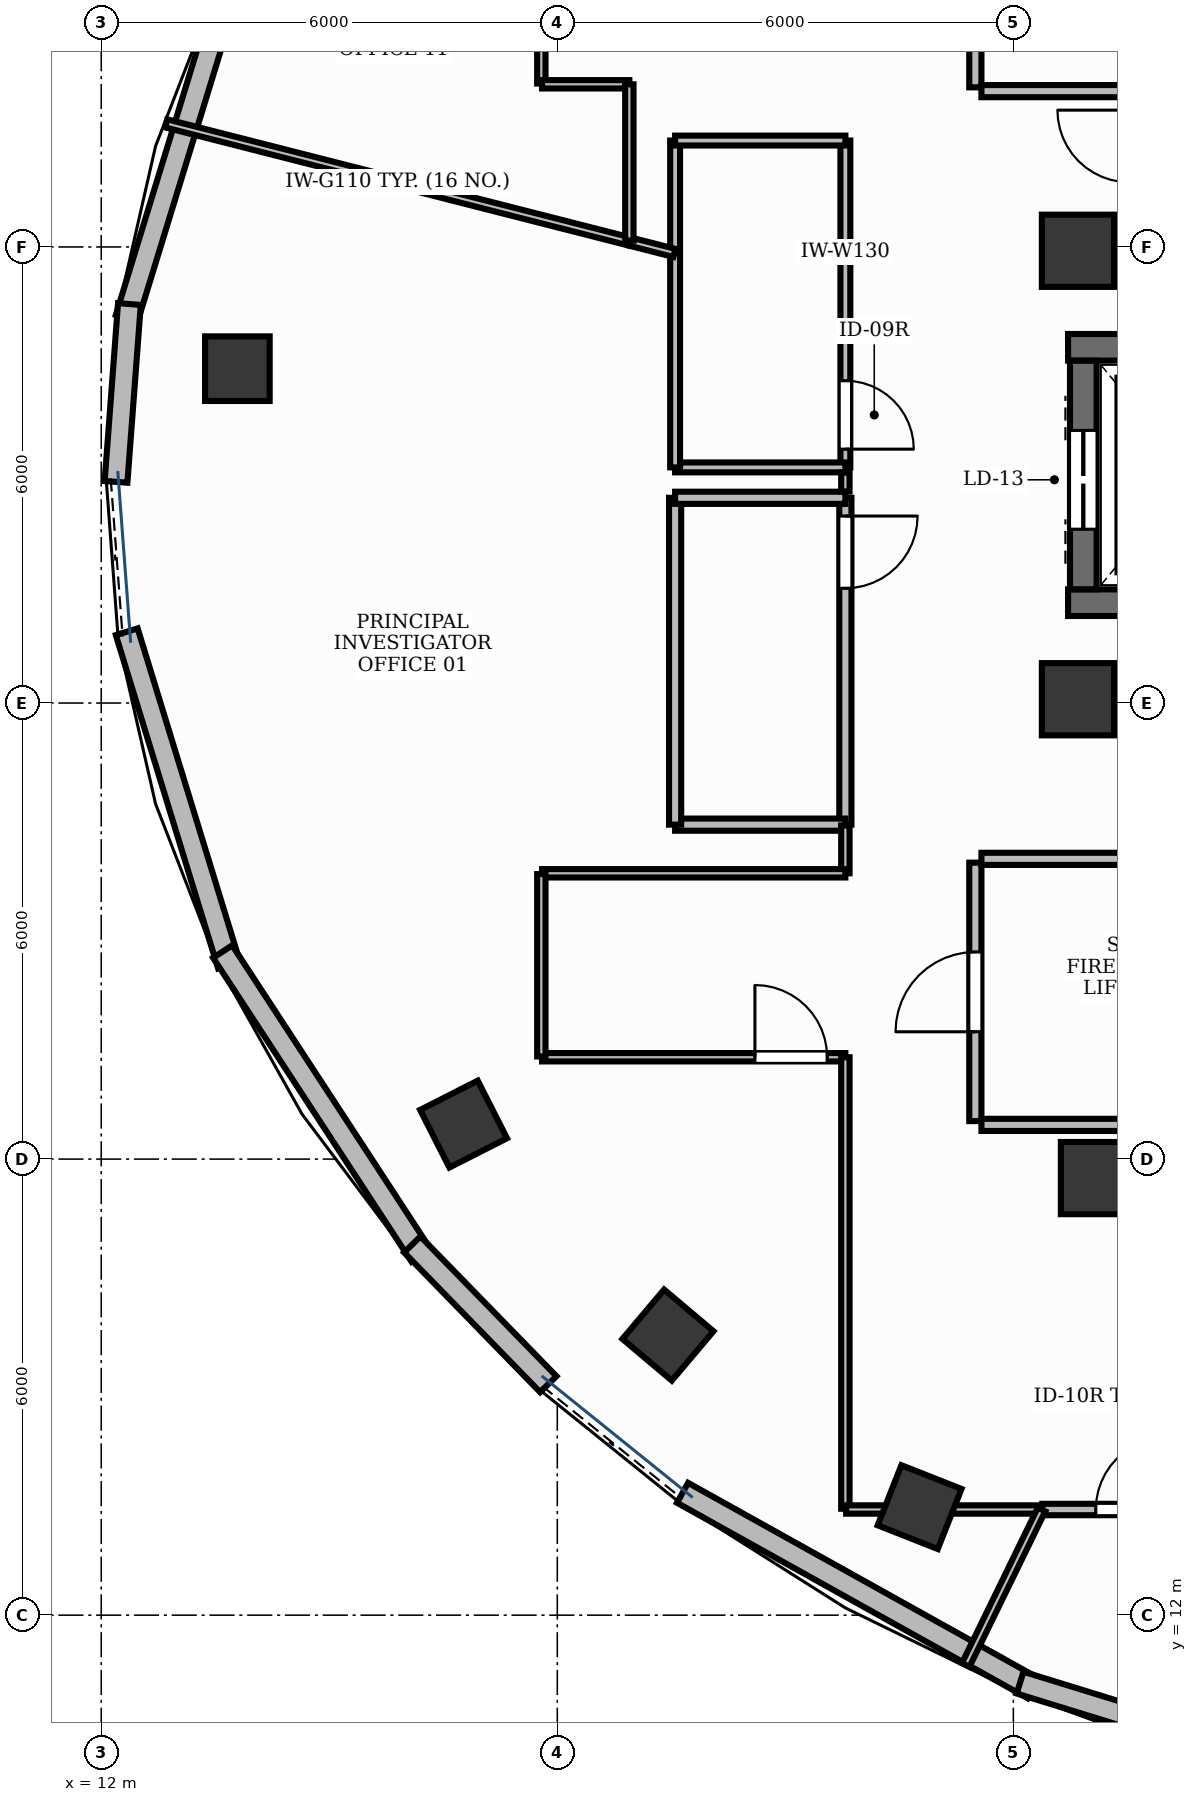
"""IFC4 building model, lengths in metres.
Left out: names, types, materials, properties, quantities, classifications, styles, units other than length and angle.
Written with IfcOpenShell. Run it as: python <this file> out.ifc"""

import sys

from ifc_helpers import new_model, si_unit, direction, frame, frame_2d, origin, origin_2d, place, context, subcontext, project, spatial, rectangle, extrude, element, fill, save


model = new_model("IFC4")
c1 = context("Model", 3, precision=1e-05, world=origin(), true_north=direction((0.0, 1.0)))
c2 = subcontext(c1, "Body", "Model", "MODEL_VIEW")
j1 = project(units=[si_unit("LENGTHUNIT", "METRE"), si_unit("PLANEANGLEUNIT", "RADIAN")], contexts=[c1])
p1 = place(None, origin())
s1 = spatial("IfcSite", under=j1, at=p1, CompositionType="ELEMENT")
p2 = place(p1, origin())
s2 = spatial("IfcBuilding", under=s1, at=p2, CompositionType="ELEMENT")
p3 = place(p2, frame((0.0, 0.0, 306.0)))
s3 = spatial("IfcBuildingStorey", under=s2, at=p3, CompositionType="ELEMENT", Elevation=306.0)
for number, where, z_axis, x_axis in (
    (1, (24.72, 28.68, 0.0), (0.0, 0.0, 1.0), (1.0, 0.0, 0.0)),
    (2, (24.72, 25.32, 0.0), (0.0, 0.0, 1.0), (1.0, 0.0, 0.0)),
):
    element("IfcWall", number, at=place(p3, frame(where, z_axis=z_axis, x_axis=x_axis)), inside=s3, PredefinedType="SHEAR", context=c2, shape_type="SweptSolid", body=[
        extrude(rectangle(XDim=3.21, YDim=0.35, at=frame_2d((1.605, 0.0))), origin(), (0.0, 0.0, 1.0), 3.9),
    ])
p4 = place(p3, frame((24.92, 25.497, 0.0), z_axis=(0.0, 0.0, 1.0), x_axis=(0.0, 1.0, 0.0)))
e3 = element("IfcWall", 3, at=p4, inside=s3, PredefinedType="SHEAR", context=c2, shape_type="SweptSolid", body=[
    extrude(rectangle(XDim=3.006, YDim=0.35, at=frame_2d((1.503, 0.0))), origin(), (0.0, 0.0, 1.0), 3.9),
])
p5 = place(p4, frame((0.79, 0.0, 0.0)))
e4 = element("IfcOpeningElement", 4, at=p5, cuts=e3, PredefinedType="OPENING", context=c2, shape_type="SweptSolid", body=[
    extrude(rectangle(XDim=1.3, YDim=2.2, at=frame_2d((0.65, 1.1))), frame((0.0, 0.19, 0.0), z_axis=(0.0, -1.0, 0.0), x_axis=(1.0, 0.0, 0.0)), (0.0, 0.0, 1.0), 0.38),
])
for number, where, z_axis, x_axis in (
    (5, (24.85, 29.95, -0.0), (0.0, 0.0, 1.0), (1.0, 0.0, 0.0)),
    (6, (24.85, 24.05, -0.0), (0.0, 0.0, 1.0), (1.0, 0.0, 0.0)),
    (7, (25.1, 17.75, -0.0), (0.0, 0.0, 1.0), (1.0, 0.0, 0.0)),
):
    element("IfcColumn", number, at=place(p3, frame(where, z_axis=z_axis, x_axis=x_axis)), inside=s3, PredefinedType="PILASTER", context=c2, shape_type="SweptSolid", body=[
        extrude(rectangle(XDim=0.95, YDim=0.95, at=origin_2d()), origin(), (0.0, 0.0, 1.0), 3.901),
    ])
for number, where, z_axis, x_axis in (
    (8, (13.791, 28.399, -0.0), (0.0, 0.0, 1.0), (0.0, 1.0, 0.0)),
    (9, (16.767, 18.46, -0.0), (0.0, 0.0, 1.0), (-0.453, 0.891, 0.0)),
    (10, (19.456, 15.685, -0.0), (0.0, 0.0, 1.0), (-0.764, 0.645, 0.0)),
    (11, (22.766, 13.421, -0.0), (0.0, 0.0, 1.0), (-0.93, 0.367, 0.0)),
):
    element("IfcColumn", number, at=place(p3, frame(where, z_axis=z_axis, x_axis=x_axis)), inside=s3, PredefinedType="COLUMN", context=c2, shape_type="SweptSolid", body=[
        extrude(rectangle(XDim=0.85, YDim=0.85, at=origin_2d()), origin(), (0.0, 0.0, 1.0), 3.901),
    ])
p6 = place(p3, frame((13.681, 33.449, 0.0), z_axis=(0.0, 0.0, 1.0), x_axis=(-0.293311854667, -0.956016817797, 0.0)))
e12 = element("IfcWall", 12, at=p6, inside=s3, PredefinedType="STANDARD", context=c2, shape_type="SweptSolid", body=[
    extrude(rectangle(XDim=4.589, YDim=0.3, at=frame_2d((2.294, 0.0))), origin(), (0.0, 0.0, 1.0), 3.9),
])
p7 = place(p3, frame((12.371, 29.249, 0.0), z_axis=(0.0, 0.0, 1.0), x_axis=(-0.075040925575, -0.997180454827, 0.0)))
e13 = element("IfcWall", 13, at=p7, inside=s3, PredefinedType="STANDARD", context=c2, shape_type="SweptSolid", body=[
    extrude(rectangle(XDim=2.346, YDim=0.3, at=frame_2d((1.173, 0.0))), origin(), (0.0, 0.0, 1.0), 3.9),
])
p8 = place(p3, frame((12.335, 24.938, 0.0), z_axis=(0.0, 0.0, 1.0), x_axis=(0.293311854667, -0.956016817797, 0.0)))
e14 = element("IfcWall", 14, at=p8, inside=s3, PredefinedType="STANDARD", context=c2, shape_type="SweptSolid", body=[
    extrude(rectangle(XDim=4.589, YDim=0.3, at=frame_2d((2.294, 0.0))), origin(), (0.0, 0.0, 1.0), 3.9),
])
p9 = place(p3, frame((13.598, 20.73, 0.0), z_axis=(0.0, 0.0, 1.0), x_axis=(0.546723072071, -0.837313491152, 0.0)))
e15 = element("IfcWall", 15, at=p9, inside=s3, PredefinedType="STANDARD", context=c2, shape_type="SweptSolid", body=[
    extrude(rectangle(XDim=4.775, YDim=0.3, at=frame_2d((2.388, 0.0))), origin(), (0.0, 0.0, 1.0), 3.9),
])
p10 = place(p3, frame((16.092, 16.877, 0.0), z_axis=(0.0, 0.0, 1.0), x_axis=(0.697621825822, -0.716466180735, 0.0)))
e16 = element("IfcWall", 16, at=p10, inside=s3, PredefinedType="STANDARD", context=c2, shape_type="SweptSolid", body=[
    extrude(rectangle(XDim=2.565, YDim=0.3, at=frame_2d((1.283, 0.0))), origin(), (0.0, 0.0, 1.0), 3.9),
])
p11 = place(p3, frame((19.648, 13.61, 0.0), z_axis=(0.0, 0.0, 1.0), x_axis=(0.87350676692, -0.486812004932, 0.0)))
e17 = element("IfcWall", 17, at=p11, inside=s3, PredefinedType="STANDARD", context=c2, shape_type="SweptSolid", body=[
    extrude(rectangle(XDim=5.282, YDim=0.3, at=frame_2d((2.641, 0.0))), origin(), (0.0, 0.0, 1.0), 3.9),
])
p12 = place(p3, frame((24.088, 11.113, 0.0), z_axis=(0.0, 0.0, 1.0), x_axis=(0.955535200816, -0.29487705913, 0.0)))
e18 = element("IfcWall", 18, at=p12, inside=s3, PredefinedType="STANDARD", context=c2, shape_type="SweptSolid", body=[
    extrude(rectangle(XDim=5.485, YDim=0.3, at=frame_2d((2.743, 0.0))), origin(), (0.0, 0.0, 1.0), 3.9),
])
p13 = place(p3, frame((23.5, 32.1, 0.0), z_axis=(0.0, 0.0, 1.0), x_axis=(0.0, 1.0, 0.0)))
e19 = element("IfcWall", 19, at=p13, inside=s3, PredefinedType="PARTITIONING", context=c2, shape_type="SweptSolid", body=[
    extrude(rectangle(XDim=3.4, YDim=0.16, at=frame_2d((1.7, 0.0))), origin(), (0.0, 0.0, 1.0), 2.91),
])
p14 = place(p13, frame((1.175, 0.0, 0.0)))
e20 = element("IfcOpeningElement", 20, at=p14, cuts=e19, PredefinedType="OPENING", context=c2, shape_type="SweptSolid", body=[
    extrude(rectangle(XDim=1.05, YDim=2.15, at=frame_2d((0.525, 1.075))), frame((0.0, 0.095, 0.0), z_axis=(0.0, -1.0, 0.0), x_axis=(1.0, 0.0, 0.0)), (0.0, 0.0, 1.0), 0.19),
])
p15 = place(p3, frame((23.5, 18.5, 0.0), z_axis=(0.0, 0.0, 1.0), x_axis=(0.0, 1.0, 0.0)))
e21 = element("IfcWall", 21, at=p15, inside=s3, PredefinedType="PARTITIONING", context=c2, shape_type="SweptSolid", body=[
    extrude(rectangle(XDim=3.4, YDim=0.16, at=frame_2d((1.7, 0.0))), origin(), (0.0, 0.0, 1.0), 2.91),
])
p16 = place(p15, frame((1.175, 0.0, 0.0)))
e22 = element("IfcOpeningElement", 22, at=p16, cuts=e21, PredefinedType="OPENING", context=c2, shape_type="SweptSolid", body=[
    extrude(rectangle(XDim=1.05, YDim=2.15, at=frame_2d((0.525, 1.075))), frame((0.0, 0.095, 0.0), z_axis=(0.0, -1.0, 0.0), x_axis=(1.0, 0.0, 0.0)), (0.0, 0.0, 1.0), 0.19),
])
for number, where, z_axis, x_axis in (
    (23, (23.58, 32.05, 0.0), (0.0, 0.0, 1.0), (1.0, 0.0, 0.0)),
    (24, (23.58, 21.95, 0.0), (0.0, 0.0, 1.0), (1.0, 0.0, 0.0)),
):
    element("IfcWall", number, at=place(p3, frame(where, z_axis=z_axis, x_axis=x_axis)), inside=s3, PredefinedType="PARTITIONING", context=c2, shape_type="SweptSolid", body=[
        extrude(rectangle(XDim=4.97, YDim=0.16, at=frame_2d((2.485, 0.0))), origin(), (0.0, 0.0, 1.0), 2.91),
    ])
p17 = place(p3, frame((23.58, 18.45, 0.0), z_axis=(0.0, 0.0, 1.0), x_axis=(1.0, 0.0, 0.0)))
e25 = element("IfcWall", 25, at=p17, inside=s3, PredefinedType="PARTITIONING", context=c2, shape_type="SweptSolid", body=[
    extrude(rectangle(XDim=2.12, YDim=0.16, at=frame_2d((1.06, 0.0))), origin(), (0.0, 0.0, 1.0), 2.91),
])
p18 = place(p3, frame((21.79, 26.7, 0.0), z_axis=(0.0, 0.0, 1.0), x_axis=(0.0, -1.0, 0.0)))
e26 = element("IfcWall", 26, at=p18, inside=s3, PredefinedType="PARTITIONING", context=c2, shape_type="SweptSolid", body=[
    extrude(rectangle(XDim=4.3, YDim=0.16, at=frame_2d((2.15, 0.0))), origin(), (0.0, 0.0, 1.0), 2.91),
])
p19 = place(p18, frame((0.24, 0.0, 0.0)))
e27 = element("IfcOpeningElement", 27, at=p19, cuts=e26, PredefinedType="OPENING", context=c2, shape_type="SweptSolid", body=[
    extrude(rectangle(XDim=0.95, YDim=2.15, at=frame_2d((0.475, 1.075))), frame((0.0, 0.095, 0.0), z_axis=(0.0, -1.0, 0.0), x_axis=(1.0, 0.0, 0.0)), (0.0, 0.0, 1.0), 0.19),
])
p20 = place(p3, frame((21.79, 31.4, 0.0), z_axis=(0.0, 0.0, 1.0), x_axis=(0.0, -1.0, 0.0)))
e28 = element("IfcWall", 28, at=p20, inside=s3, PredefinedType="PARTITIONING", context=c2, shape_type="SweptSolid", body=[
    extrude(rectangle(XDim=4.3, YDim=0.13, at=frame_2d((2.15, 0.0))), origin(), (0.0, 0.0, 1.0), 2.91),
])
p21 = place(p20, frame((3.16, 0.0, 0.0)))
e29 = element("IfcOpeningElement", 29, at=p21, cuts=e28, PredefinedType="OPENING", context=c2, shape_type="SweptSolid", body=[
    extrude(rectangle(XDim=0.9, YDim=2.15, at=frame_2d((0.45, 1.075))), frame((0.0, 0.08, 0.0), z_axis=(0.0, -1.0, 0.0), x_axis=(1.0, 0.0, 0.0)), (0.0, 0.0, 1.0), 0.16),
])
p22 = place(p3, frame((17.8, 19.34, 0.0), z_axis=(0.0, 0.0, 1.0), x_axis=(1.0, 0.0, 0.0)))
e30 = element("IfcWall", 30, at=p22, inside=s3, PredefinedType="MOVABLE", context=c2, shape_type="SweptSolid", body=[
    extrude(rectangle(XDim=3.99, YDim=0.11, at=frame_2d((1.995, 0.0))), origin(), (0.0, 0.0, 1.0), 2.91),
])
p23 = place(p22, frame((2.8, 0.0, 0.0)))
e31 = element("IfcOpeningElement", 31, at=p23, cuts=e30, PredefinedType="OPENING", context=c2, shape_type="SweptSolid", body=[
    extrude(rectangle(XDim=0.95, YDim=2.15, at=frame_2d((0.475, 1.075))), frame((0.0, 0.07, 0.0), z_axis=(0.0, -1.0, 0.0), x_axis=(1.0, 0.0, 0.0)), (0.0, 0.0, 1.0), 0.14),
])
p24 = place(p3, frame((24.381, 13.39, 0.0), z_axis=(0.0, 0.0, 1.0), x_axis=(1.0, 0.0, 0.0)))
e32 = element("IfcWall", 32, at=p24, inside=s3, PredefinedType="PARTITIONING", context=c2, shape_type="SweptSolid", body=[
    extrude(rectangle(XDim=3.083, YDim=0.15, at=frame_2d((1.542, 0.0))), origin(), (0.0, 0.0, 1.0), 2.91),
])
p25 = place(p24, frame((0.704, 0.0, 0.0)))
e33 = element("IfcOpeningElement", 33, at=p25, cuts=e32, PredefinedType="OPENING", context=c2, shape_type="SweptSolid", body=[
    extrude(rectangle(XDim=0.95, YDim=2.15, at=frame_2d((0.475, 1.075))), frame((0.0, 0.09, 0.0), z_axis=(0.0, -1.0, 0.0), x_axis=(1.0, 0.0, 0.0)), (0.0, 0.0, 1.0), 0.18),
])
p26 = place(p3, frame((21.79, 22.4, 0.0), z_axis=(0.0, 0.0, 1.0), x_axis=(-1.0, 0.0, 0.0)))
e34 = element("IfcWall", 34, at=p26, inside=s3, PredefinedType="PARTITIONING", context=c2, shape_type="SweptSolid", body=[
    extrude(rectangle(XDim=2.24, YDim=0.16, at=frame_2d((1.12, 0.0))), origin(), (0.0, 0.0, 1.0), 2.91),
])
p27 = place(p3, frame((19.55, 22.4, 0.0), z_axis=(0.0, 0.0, 1.0), x_axis=(0.0, 1.0, 0.0)))
e35 = element("IfcWall", 35, at=p27, inside=s3, PredefinedType="PARTITIONING", context=c2, shape_type="SweptSolid", body=[
    extrude(rectangle(XDim=4.3, YDim=0.16, at=frame_2d((2.15, 0.0))), origin(), (0.0, 0.0, 1.0), 2.91),
])
p28 = place(p3, frame((19.55, 26.7, 0.0), z_axis=(0.0, 0.0, 1.0), x_axis=(1.0, 0.0, 0.0)))
e36 = element("IfcWall", 36, at=p28, inside=s3, PredefinedType="PARTITIONING", context=c2, shape_type="SweptSolid", body=[
    extrude(rectangle(XDim=2.24, YDim=0.16, at=frame_2d((1.12, 0.0))), origin(), (0.0, 0.0, 1.0), 2.91),
])
p29 = place(p3, frame((21.79, 27.1, 0.0), z_axis=(0.0, 0.0, 1.0), x_axis=(-1.0, 0.0, 0.0)))
e37 = element("IfcWall", 37, at=p29, inside=s3, PredefinedType="PARTITIONING", context=c2, shape_type="SweptSolid", body=[
    extrude(rectangle(XDim=2.24, YDim=0.13, at=frame_2d((1.12, 0.0))), origin(), (0.0, 0.0, 1.0), 2.91),
])
p30 = place(p3, frame((19.55, 27.1, 0.0), z_axis=(0.0, 0.0, 1.0), x_axis=(0.0, 1.0, 0.0)))
e38 = element("IfcWall", 38, at=p30, inside=s3, PredefinedType="PARTITIONING", context=c2, shape_type="SweptSolid", body=[
    extrude(rectangle(XDim=4.3, YDim=0.13, at=frame_2d((2.15, 0.0))), origin(), (0.0, 0.0, 1.0), 2.91),
])
p31 = place(p3, frame((19.55, 31.4, 0.0), z_axis=(0.0, 0.0, 1.0), x_axis=(1.0, 0.0, 0.0)))
e39 = element("IfcWall", 39, at=p31, inside=s3, PredefinedType="PARTITIONING", context=c2, shape_type="SweptSolid", body=[
    extrude(rectangle(XDim=2.24, YDim=0.13, at=frame_2d((1.12, 0.0))), origin(), (0.0, 0.0, 1.0), 2.91),
])
p32 = place(p3, frame((12.854, 31.626, 0.0), z_axis=(0.0, 0.0, 1.0), x_axis=(0.96901544636, -0.247000131004, 0.0)))
e40 = element("IfcWall", 40, at=p32, inside=s3, PredefinedType="MOVABLE", context=c2, shape_type="SweptSolid", body=[
    extrude(rectangle(XDim=6.288, YDim=0.11, at=frame_2d((3.144, 0.0))), origin(), (0.0, 0.0, 1.0), 2.91),
])
p33 = place(p3, frame((18.952, 30.072, 0.0), z_axis=(0.0, 0.0, 1.0), x_axis=(0.968995646976, -0.247077793706, 0.0)))
e41 = element("IfcWall", 41, at=p33, inside=s3, PredefinedType="MOVABLE", context=c2, shape_type="SweptSolid", body=[
    extrude(rectangle(XDim=0.607, YDim=0.11, at=frame_2d((0.303, 0.0))), origin(), (0.0, 0.0, 1.0), 2.91),
])
p34 = place(p3, frame((21.79, 27.032, 0.0), z_axis=(0.0, 0.0, 1.0), x_axis=(0.0, -1.0, 0.0)))
e42 = element("IfcWall", 42, at=p34, inside=s3, PredefinedType="MOVABLE", context=c2, shape_type="SweptSolid", body=[
    extrude(rectangle(XDim=0.249, YDim=0.11, at=frame_2d((0.125, 0.0))), origin(), (0.0, 0.0, 1.0), 2.91),
])
p35 = place(p3, frame((21.79, 22.39, 0.0), z_axis=(0.0, 0.0, 1.0), x_axis=(0.0, -1.0, 0.0)))
e43 = element("IfcWall", 43, at=p35, inside=s3, PredefinedType="MOVABLE", context=c2, shape_type="SweptSolid", body=[
    extrude(rectangle(XDim=0.63, YDim=0.11, at=frame_2d((0.315, 0.0))), origin(), (0.0, 0.0, 1.0), 2.91),
])
p36 = place(p3, frame((21.79, 21.76, 0.0), z_axis=(0.0, 0.0, 1.0), x_axis=(-1.0, 0.0, 0.0)))
e44 = element("IfcWall", 44, at=p36, inside=s3, PredefinedType="MOVABLE", context=c2, shape_type="SweptSolid", body=[
    extrude(rectangle(XDim=3.99, YDim=0.11, at=frame_2d((1.995, 0.0))), origin(), (0.0, 0.0, 1.0), 2.91),
])
p37 = place(p3, frame((17.79, 21.75, 0.0), z_axis=(0.0, 0.0, 1.0), x_axis=(0.0, -1.0, 0.0)))
e45 = element("IfcWall", 45, at=p37, inside=s3, PredefinedType="MOVABLE", context=c2, shape_type="SweptSolid", body=[
    extrude(rectangle(XDim=2.4, YDim=0.11, at=frame_2d((1.2, 0.0))), origin(), (0.0, 0.0, 1.0), 2.91),
])
p38 = place(p3, frame((21.79, 19.34, 0.0), z_axis=(0.0, 0.0, 1.0), x_axis=(0.0, -1.0, 0.0)))
e46 = element("IfcWall", 46, at=p38, inside=s3, PredefinedType="MOVABLE", context=c2, shape_type="SweptSolid", body=[
    extrude(rectangle(XDim=5.94, YDim=0.11, at=frame_2d((2.97, 0.0))), origin(), (0.0, 0.0, 1.0), 2.91),
])
p39 = place(p3, frame((21.8, 13.39, 0.0), z_axis=(0.0, 0.0, 1.0), x_axis=(1.0, 0.0, 0.0)))
e47 = element("IfcWall", 47, at=p39, inside=s3, PredefinedType="MOVABLE", context=c2, shape_type="SweptSolid", body=[
    extrude(rectangle(XDim=2.571, YDim=0.11, at=frame_2d((1.285, 0.0))), origin(), (0.0, 0.0, 1.0), 2.91),
])
p40 = place(p3, frame((24.371, 13.39, 0.0), z_axis=(0.0, 0.0, 1.0), x_axis=(-0.438396158112, -0.898781847031, 0.0)))
e48 = element("IfcWall", 48, at=p40, inside=s3, PredefinedType="MOVABLE", context=c2, shape_type="SweptSolid", body=[
    extrude(rectangle(XDim=2.276, YDim=0.11, at=frame_2d((1.138, 0.0))), origin(), (0.0, 0.0, 1.0), 2.91),
])
p41 = place(p3, frame((17.79, 34.55, 0.0), z_axis=(0.0, 0.0, 1.0), x_axis=(0.0, -1.0, 0.0)))
e49 = element("IfcWall", 49, at=p41, inside=s3, PredefinedType="MOVABLE", context=c2, shape_type="SweptSolid", body=[
    extrude(rectangle(XDim=2.4, YDim=0.11, at=frame_2d((1.2, 0.0))), origin(), (0.0, 0.0, 1.0), 2.91),
])
p42 = place(p3, frame((17.8, 32.14, 0.0), z_axis=(0.0, 0.0, 1.0), x_axis=(1.0, 0.0, 0.0)))
e50 = element("IfcWall", 50, at=p42, inside=s3, PredefinedType="MOVABLE", context=c2, shape_type="SweptSolid", body=[
    extrude(rectangle(XDim=1.148, YDim=0.11, at=frame_2d((0.574, 0.0))), origin(), (0.0, 0.0, 1.0), 2.91),
])
p43 = place(p3, frame((18.948, 32.14, 0.0), z_axis=(0.0, 0.0, 1.0), x_axis=(0.0, -1.0, 0.0)))
e51 = element("IfcWall", 51, at=p43, inside=s3, PredefinedType="MOVABLE", context=c2, shape_type="SweptSolid", body=[
    extrude(rectangle(XDim=2.057, YDim=0.11, at=frame_2d((1.028, 0.0))), origin(), (0.0, 0.0, 1.0), 2.91),
])
p44 = place(p5, origin())
e52 = element("IfcDoor", 52, at=p44, inside=s3, OperationType="DOUBLE_DOOR_SLIDING", PredefinedType="DOOR", context=c2, shape_type="SweptSolid", body=[
    extrude(rectangle(XDim=1.3, YDim=2.2, at=frame_2d((0.65, 1.1))), frame((0.0, 0.025, 0.0), z_axis=(0.0, -1.0, 0.0), x_axis=(1.0, 0.0, 0.0)), (0.0, 0.0, 1.0), 0.05),
])
fill(e4, e52)
p45 = place(p16, origin())
e53 = element("IfcDoor", 53, at=p45, inside=s3, OperationType="SINGLE_SWING_LEFT", PredefinedType="DOOR", context=c2, shape_type="SweptSolid", body=[
    extrude(rectangle(XDim=1.05, YDim=2.15, at=frame_2d((0.525, 1.075))), frame((0.0, 0.025, 0.0), z_axis=(0.0, -1.0, 0.0), x_axis=(1.0, 0.0, 0.0)), (0.0, 0.0, 1.0), 0.05),
])
fill(e22, e53)
p46 = place(p19, origin())
e54 = element("IfcDoor", 54, at=p46, inside=s3, OperationType="SINGLE_SWING_LEFT", PredefinedType="DOOR", context=c2, shape_type="SweptSolid", body=[
    extrude(rectangle(XDim=0.95, YDim=2.15, at=frame_2d((0.475, 1.075))), frame((0.0, 0.025, 0.0), z_axis=(0.0, -1.0, 0.0), x_axis=(1.0, 0.0, 0.0)), (0.0, 0.0, 1.0), 0.05),
])
fill(e27, e54)
p47 = place(p21, origin())
e55 = element("IfcDoor", 55, at=p47, inside=s3, OperationType="SINGLE_SWING_RIGHT", PredefinedType="DOOR", context=c2, shape_type="SweptSolid", body=[
    extrude(rectangle(XDim=0.9, YDim=2.15, at=frame_2d((0.45, 1.075))), frame((0.0, 0.025, 0.0), z_axis=(0.0, -1.0, 0.0), x_axis=(1.0, 0.0, 0.0)), (0.0, 0.0, 1.0), 0.05),
])
fill(e29, e55)
p48 = place(p23, origin())
e56 = element("IfcDoor", 56, at=p48, inside=s3, OperationType="SINGLE_SWING_LEFT", PredefinedType="DOOR", context=c2, shape_type="SweptSolid", body=[
    extrude(rectangle(XDim=0.95, YDim=2.15, at=frame_2d((0.475, 1.075))), frame((0.0, 0.025, 0.0), z_axis=(0.0, -1.0, 0.0), x_axis=(1.0, 0.0, 0.0)), (0.0, 0.0, 1.0), 0.05),
])
fill(e31, e56)
p49 = place(p25, origin())
e57 = element("IfcDoor", 57, at=p49, inside=s3, OperationType="SINGLE_SWING_RIGHT", PredefinedType="DOOR", context=c2, shape_type="SweptSolid", body=[
    extrude(rectangle(XDim=0.95, YDim=2.15, at=frame_2d((0.475, 1.075))), frame((0.0, 0.025, 0.0), z_axis=(0.0, -1.0, 0.0), x_axis=(1.0, 0.0, 0.0)), (0.0, 0.0, 1.0), 0.05),
])
fill(e33, e57)
save(model, sys.argv[1])
